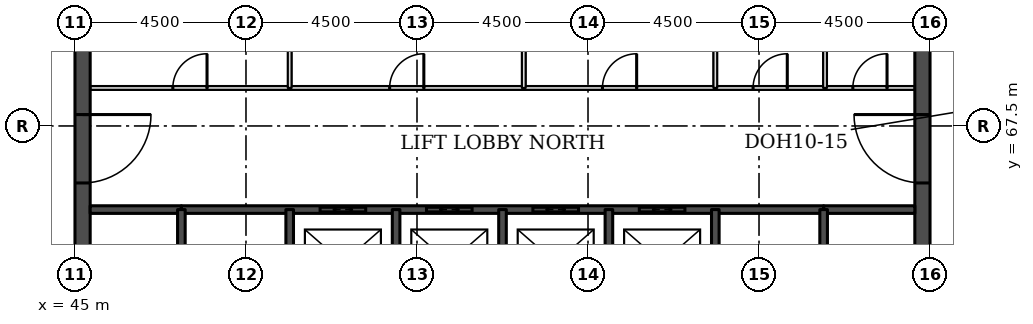
"""IFC4 building model, lengths in metres.
Left out: names, types, materials, properties, quantities, classifications, styles, units other than length and angle.
Written with IfcOpenShell. Run it as: python <this file> out.ifc"""

import sys

from ifc_helpers import new_model, si_unit, direction, frame, frame_2d, origin, place, context, subcontext, project, spatial, rectangle, extrude, element, fill, save


model = new_model("IFC4")
c1 = context("Model", 3, precision=1e-05, world=origin(), true_north=direction((0.0, 1.0)))
c2 = subcontext(c1, "Body", "Model", "MODEL_VIEW")
j1 = project(units=[si_unit("LENGTHUNIT", "METRE"), si_unit("PLANEANGLEUNIT", "RADIAN")], contexts=[c1])
p1 = place(None, origin())
s1 = spatial("IfcSite", under=j1, at=p1, CompositionType="ELEMENT")
p2 = place(p1, origin())
s2 = spatial("IfcBuilding", under=s1, at=p2, CompositionType="ELEMENT")
p3 = place(p2, frame((0.0, 0.0, 223.0)))
s3 = spatial("IfcBuildingStorey", under=s2, at=p3, CompositionType="ELEMENT", Elevation=223.0)
p4 = place(p3, frame((45.2, 49.5, 0.0), z_axis=(0.0, 0.0, 1.0), x_axis=(0.0, 1.0, 0.0)))
e1 = element("IfcWall", 1, at=p4, inside=s3, PredefinedType="SHEAR", context=c2, shape_type="SweptSolid", body=[
    extrude(rectangle(XDim=22.5, YDim=0.4, at=frame_2d((11.25, 0.0))), origin(), (0.0, 0.0, 1.0), 3.7),
])
p5 = place(p4, frame((4.2, 0.0, 0.0)))
e2 = element("IfcOpeningElement", 2, at=p5, cuts=e1, PredefinedType="OPENING", context=c2, shape_type="SweptSolid", body=[
    extrude(rectangle(XDim=1.8, YDim=2.1, at=frame_2d((0.9, 1.05))), frame((0.0, 0.21, 0.0), z_axis=(0.0, -1.0, 0.0), x_axis=(1.0, 0.0, 0.0)), (0.0, 0.0, 1.0), 0.42),
])
p6 = place(p4, frame((6.9, 0.0, 0.0)))
e3 = element("IfcOpeningElement", 3, at=p6, cuts=e1, PredefinedType="OPENING", context=c2, shape_type="SweptSolid", body=[
    extrude(rectangle(XDim=1.1, YDim=2.1, at=frame_2d((0.55, 1.05))), frame((0.0, 0.21, 0.0), z_axis=(0.0, -1.0, 0.0), x_axis=(1.0, 0.0, 0.0)), (0.0, 0.0, 1.0), 0.42),
])
p7 = place(p4, frame((13.6, 0.0, 0.0)))
e4 = element("IfcOpeningElement", 4, at=p7, cuts=e1, PredefinedType="OPENING", context=c2, shape_type="SweptSolid", body=[
    extrude(rectangle(XDim=1.1, YDim=2.1, at=frame_2d((0.55, 1.05))), frame((0.0, 0.21, 0.0), z_axis=(0.0, -1.0, 0.0), x_axis=(1.0, 0.0, 0.0)), (0.0, 0.0, 1.0), 0.42),
])
p8 = place(p4, frame((16.5, 0.0, 0.0)))
e5 = element("IfcOpeningElement", 5, at=p8, cuts=e1, PredefinedType="OPENING", context=c2, shape_type="SweptSolid", body=[
    extrude(rectangle(XDim=1.8, YDim=2.1, at=frame_2d((0.9, 1.05))), frame((0.0, 0.21, 0.0), z_axis=(0.0, -1.0, 0.0), x_axis=(1.0, 0.0, 0.0)), (0.0, 0.0, 1.0), 0.42),
])
p9 = place(p3, frame((67.3, 49.5, 0.0), z_axis=(0.0, 0.0, 1.0), x_axis=(0.0, 1.0, 0.0)))
e6 = element("IfcWall", 6, at=p9, inside=s3, PredefinedType="SHEAR", context=c2, shape_type="SweptSolid", body=[
    extrude(rectangle(XDim=22.5, YDim=0.4, at=frame_2d((11.25, 0.0))), origin(), (0.0, 0.0, 1.0), 3.7),
])
p10 = place(p9, frame((4.2, 0.0, 0.0)))
e7 = element("IfcOpeningElement", 7, at=p10, cuts=e6, PredefinedType="OPENING", context=c2, shape_type="SweptSolid", body=[
    extrude(rectangle(XDim=1.8, YDim=2.1, at=frame_2d((0.9, 1.05))), frame((0.0, 0.21, 0.0), z_axis=(0.0, -1.0, 0.0), x_axis=(1.0, 0.0, 0.0)), (0.0, 0.0, 1.0), 0.42),
])
p11 = place(p9, frame((6.9, 0.0, 0.0)))
e8 = element("IfcOpeningElement", 8, at=p11, cuts=e6, PredefinedType="OPENING", context=c2, shape_type="SweptSolid", body=[
    extrude(rectangle(XDim=1.1, YDim=2.1, at=frame_2d((0.55, 1.05))), frame((0.0, 0.21, 0.0), z_axis=(0.0, -1.0, 0.0), x_axis=(1.0, 0.0, 0.0)), (0.0, 0.0, 1.0), 0.42),
])
p12 = place(p9, frame((13.6, 0.0, 0.0)))
e9 = element("IfcOpeningElement", 9, at=p12, cuts=e6, PredefinedType="OPENING", context=c2, shape_type="SweptSolid", body=[
    extrude(rectangle(XDim=1.1, YDim=2.1, at=frame_2d((0.55, 1.05))), frame((0.0, 0.21, 0.0), z_axis=(0.0, -1.0, 0.0), x_axis=(1.0, 0.0, 0.0)), (0.0, 0.0, 1.0), 0.42),
])
p13 = place(p9, frame((16.5, 0.0, 0.0)))
e10 = element("IfcOpeningElement", 10, at=p13, cuts=e6, PredefinedType="OPENING", context=c2, shape_type="SweptSolid", body=[
    extrude(rectangle(XDim=1.8, YDim=2.1, at=frame_2d((0.9, 1.05))), frame((0.0, 0.21, 0.0), z_axis=(0.0, -1.0, 0.0), x_axis=(1.0, 0.0, 0.0)), (0.0, 0.0, 1.0), 0.42),
])
for number, where, z_axis, x_axis in (
    (11, (45.4, 65.3, 0.0), (0.0, 0.0, 1.0), (1.0, 0.0, 0.0)),
    (12, (64.7, 65.3, 0.0), (0.0, 0.0, 1.0), (1.0, 0.0, 0.0)),
):
    element("IfcWall", number, at=place(p3, frame(where, z_axis=z_axis, x_axis=x_axis)), inside=s3, PredefinedType="SOLIDWALL", context=c2, shape_type="SweptSolid", body=[
        extrude(rectangle(XDim=2.4, YDim=0.2, at=frame_2d((1.2, 0.0))), origin(), (0.0, 0.0, 1.0), 3.55),
    ])
p14 = place(p3, frame((47.8, 65.3, 0.0), z_axis=(0.0, 0.0, 1.0), x_axis=(1.0, 0.0, 0.0)))
e13 = element("IfcWall", 13, at=p14, inside=s3, PredefinedType="SOLIDWALL", context=c2, shape_type="SweptSolid", body=[
    extrude(rectangle(XDim=16.9, YDim=0.2, at=frame_2d((8.45, 0.0))), origin(), (0.0, 0.0, 1.0), 3.55),
])
p15 = place(p14, frame((3.65, 0.0, 0.0)))
e14 = element("IfcOpeningElement", 14, at=p15, cuts=e13, PredefinedType="OPENING", context=c2, shape_type="SweptSolid", body=[
    extrude(rectangle(XDim=1.2, YDim=2.1, at=frame_2d((0.6, 1.05))), frame((0.0, 0.11, 0.0), z_axis=(0.0, -1.0, 0.0), x_axis=(1.0, 0.0, 0.0)), (0.0, 0.0, 1.0), 0.22),
])
p16 = place(p14, frame((6.45, 0.0, 0.0)))
e15 = element("IfcOpeningElement", 15, at=p16, cuts=e13, PredefinedType="OPENING", context=c2, shape_type="SweptSolid", body=[
    extrude(rectangle(XDim=1.2, YDim=2.1, at=frame_2d((0.6, 1.05))), frame((0.0, 0.11, 0.0), z_axis=(0.0, -1.0, 0.0), x_axis=(1.0, 0.0, 0.0)), (0.0, 0.0, 1.0), 0.22),
])
p17 = place(p14, frame((9.25, 0.0, 0.0)))
e16 = element("IfcOpeningElement", 16, at=p17, cuts=e13, PredefinedType="OPENING", context=c2, shape_type="SweptSolid", body=[
    extrude(rectangle(XDim=1.2, YDim=2.1, at=frame_2d((0.6, 1.05))), frame((0.0, 0.11, 0.0), z_axis=(0.0, -1.0, 0.0), x_axis=(1.0, 0.0, 0.0)), (0.0, 0.0, 1.0), 0.22),
])
p18 = place(p14, frame((12.05, 0.0, 0.0)))
e17 = element("IfcOpeningElement", 17, at=p18, cuts=e13, PredefinedType="OPENING", context=c2, shape_type="SweptSolid", body=[
    extrude(rectangle(XDim=1.2, YDim=2.1, at=frame_2d((0.6, 1.05))), frame((0.0, 0.11, 0.0), z_axis=(0.0, -1.0, 0.0), x_axis=(1.0, 0.0, 0.0)), (0.0, 0.0, 1.0), 0.22),
])
p19 = place(p3, frame((45.4, 68.5, 0.0), z_axis=(0.0, 0.0, 1.0), x_axis=(1.0, 0.0, 0.0)))
e18 = element("IfcWall", 18, at=p19, inside=s3, PredefinedType="PARTITIONING", context=c2, shape_type="SweptSolid", body=[
    extrude(rectangle(XDim=21.7, YDim=0.1, at=frame_2d((10.85, 0.0))), origin(), (0.0, 0.0, 1.0), 3.55),
])
p20 = place(p19, frame((20.069, 0.0, 0.0)))
e19 = element("IfcOpeningElement", 19, at=p20, cuts=e18, PredefinedType="OPENING", context=c2, shape_type="SweptSolid", body=[
    extrude(rectangle(XDim=0.9, YDim=2.1, at=frame_2d((0.45, 1.05))), frame((0.0, 0.06, 0.0), z_axis=(0.0, -1.0, 0.0), x_axis=(1.0, 0.0, 0.0)), (0.0, 0.0, 1.0), 0.12),
])
p21 = place(p19, frame((17.444, 0.0, 0.0)))
e20 = element("IfcOpeningElement", 20, at=p21, cuts=e18, PredefinedType="OPENING", context=c2, shape_type="SweptSolid", body=[
    extrude(rectangle(XDim=0.9, YDim=2.1, at=frame_2d((0.45, 1.05))), frame((0.0, 0.06, 0.0), z_axis=(0.0, -1.0, 0.0), x_axis=(1.0, 0.0, 0.0)), (0.0, 0.0, 1.0), 0.12),
])
p22 = place(p19, frame((2.175, 0.0, 0.0)))
e21 = element("IfcOpeningElement", 21, at=p22, cuts=e18, PredefinedType="OPENING", context=c2, shape_type="SweptSolid", body=[
    extrude(rectangle(XDim=0.9, YDim=2.1, at=frame_2d((0.45, 1.05))), frame((0.0, 0.06, 0.0), z_axis=(0.0, -1.0, 0.0), x_axis=(1.0, 0.0, 0.0)), (0.0, 0.0, 1.0), 0.12),
])
p23 = place(p19, frame((13.48, 0.0, 0.0)))
e22 = element("IfcOpeningElement", 22, at=p23, cuts=e18, PredefinedType="OPENING", context=c2, shape_type="SweptSolid", body=[
    extrude(rectangle(XDim=0.9, YDim=2.1, at=frame_2d((0.45, 1.05))), frame((0.0, 0.06, 0.0), z_axis=(0.0, -1.0, 0.0), x_axis=(1.0, 0.0, 0.0)), (0.0, 0.0, 1.0), 0.12),
])
p24 = place(p19, frame((7.88, 0.0, 0.0)))
e23 = element("IfcOpeningElement", 23, at=p24, cuts=e18, PredefinedType="OPENING", context=c2, shape_type="SweptSolid", body=[
    extrude(rectangle(XDim=0.9, YDim=2.1, at=frame_2d((0.45, 1.05))), frame((0.0, 0.06, 0.0), z_axis=(0.0, -1.0, 0.0), x_axis=(1.0, 0.0, 0.0)), (0.0, 0.0, 1.0), 0.12),
])
p25 = place(p3, frame((47.8, 62.0, 0.0), z_axis=(0.0, 0.0, 1.0), x_axis=(0.0, 1.0, 0.0)))
e24 = element("IfcWall", 24, at=p25, inside=s3, PredefinedType="SOLIDWALL", context=c2, shape_type="SweptSolid", body=[
    extrude(rectangle(XDim=3.3, YDim=0.2, at=frame_2d((1.65, 0.0))), origin(), (0.0, 0.0, 1.0), 3.55),
])
p26 = place(p25, frame((1.1, 0.0, 0.0)))
e25 = element("IfcOpeningElement", 25, at=p26, cuts=e24, PredefinedType="OPENING", context=c2, shape_type="SweptSolid", body=[
    extrude(rectangle(XDim=1.1, YDim=2.1, at=frame_2d((0.55, 1.05))), frame((0.0, 0.11, 0.0), z_axis=(0.0, -1.0, 0.0), x_axis=(1.0, 0.0, 0.0)), (0.0, 0.0, 1.0), 0.22),
])
p27 = place(p3, frame((50.65, 68.5, 0.0), z_axis=(0.0, 0.0, 1.0), x_axis=(0.0, 1.0, 0.0)))
e26 = element("IfcWall", 26, at=p27, inside=s3, PredefinedType="PARTITIONING", context=c2, shape_type="SweptSolid", body=[
    extrude(rectangle(XDim=3.1, YDim=0.1, at=frame_2d((1.55, 0.0))), origin(), (0.0, 0.0, 1.0), 3.55),
])
p28 = place(p3, frame((50.65, 62.0, 0.0), z_axis=(0.0, 0.0, 1.0), x_axis=(0.0, 1.0, 0.0)))
e27 = element("IfcWall", 27, at=p28, inside=s3, PredefinedType="SOLIDWALL", context=c2, shape_type="SweptSolid", body=[
    extrude(rectangle(XDim=3.3, YDim=0.2, at=frame_2d((1.65, 0.0))), origin(), (0.0, 0.0, 1.0), 3.55),
])
for number, where, z_axis, x_axis in (
    (28, (53.45, 62.5, 0.0), (0.0, 0.0, 1.0), (0.0, 1.0, 0.0)),
    (29, (56.25, 62.5, 0.0), (0.0, 0.0, 1.0), (0.0, 1.0, 0.0)),
):
    element("IfcWall", number, at=place(p3, frame(where, z_axis=z_axis, x_axis=x_axis)), inside=s3, PredefinedType="SOLIDWALL", context=c2, shape_type="SweptSolid", body=[
        extrude(rectangle(XDim=2.8, YDim=0.2, at=frame_2d((1.4, 0.0))), origin(), (0.0, 0.0, 1.0), 3.55),
    ])
p29 = place(p3, frame((56.81, 68.5, 0.0), z_axis=(0.0, 0.0, 1.0), x_axis=(0.0, 1.0, 0.0)))
e30 = element("IfcWall", 30, at=p29, inside=s3, PredefinedType="PARTITIONING", context=c2, shape_type="SweptSolid", body=[
    extrude(rectangle(XDim=3.1, YDim=0.1, at=frame_2d((1.55, 0.0))), origin(), (0.0, 0.0, 1.0), 3.55),
])
p30 = place(p3, frame((59.05, 62.5, 0.0), z_axis=(0.0, 0.0, 1.0), x_axis=(0.0, 1.0, 0.0)))
e31 = element("IfcWall", 31, at=p30, inside=s3, PredefinedType="SOLIDWALL", context=c2, shape_type="SweptSolid", body=[
    extrude(rectangle(XDim=2.8, YDim=0.2, at=frame_2d((1.4, 0.0))), origin(), (0.0, 0.0, 1.0), 3.55),
])
p31 = place(p3, frame((61.85, 68.5, 0.0), z_axis=(0.0, 0.0, 1.0), x_axis=(0.0, 1.0, 0.0)))
e32 = element("IfcWall", 32, at=p31, inside=s3, PredefinedType="PARTITIONING", context=c2, shape_type="SweptSolid", body=[
    extrude(rectangle(XDim=3.1, YDim=0.1, at=frame_2d((1.55, 0.0))), origin(), (0.0, 0.0, 1.0), 3.55),
])
p32 = place(p3, frame((61.85, 62.0, 0.0), z_axis=(0.0, 0.0, 1.0), x_axis=(0.0, 1.0, 0.0)))
e33 = element("IfcWall", 33, at=p32, inside=s3, PredefinedType="SOLIDWALL", context=c2, shape_type="SweptSolid", body=[
    extrude(rectangle(XDim=3.3, YDim=0.2, at=frame_2d((1.65, 0.0))), origin(), (0.0, 0.0, 1.0), 3.55),
])
p33 = place(p3, frame((64.7, 62.0, 0.0), z_axis=(0.0, 0.0, 1.0), x_axis=(0.0, 1.0, 0.0)))
e34 = element("IfcWall", 34, at=p33, inside=s3, PredefinedType="SOLIDWALL", context=c2, shape_type="SweptSolid", body=[
    extrude(rectangle(XDim=3.3, YDim=0.2, at=frame_2d((1.65, 0.0))), origin(), (0.0, 0.0, 1.0), 3.55),
])
p34 = place(p33, frame((1.1, 0.0, 0.0)))
e35 = element("IfcOpeningElement", 35, at=p34, cuts=e34, PredefinedType="OPENING", context=c2, shape_type="SweptSolid", body=[
    extrude(rectangle(XDim=1.1, YDim=2.1, at=frame_2d((0.55, 1.05))), frame((0.0, 0.11, 0.0), z_axis=(0.0, -1.0, 0.0), x_axis=(1.0, 0.0, 0.0)), (0.0, 0.0, 1.0), 0.22),
])
p35 = place(p3, frame((64.738, 68.5, 0.0), z_axis=(0.0, 0.0, 1.0), x_axis=(0.0, 1.0, 0.0)))
e36 = element("IfcWall", 36, at=p35, inside=s3, PredefinedType="PARTITIONING", context=c2, shape_type="SweptSolid", body=[
    extrude(rectangle(XDim=3.1, YDim=0.1, at=frame_2d((1.55, 0.0))), origin(), (0.0, 0.0, 1.0), 3.55),
])
p36 = place(p15, origin())
e37 = element("IfcDoor", 37, at=p36, inside=s3, OperationType="DOUBLE_DOOR_SLIDING", PredefinedType="DOOR", context=c2, shape_type="SweptSolid", body=[
    extrude(rectangle(XDim=1.2, YDim=2.1, at=frame_2d((0.6, 1.05))), frame((0.0, 0.025, 0.0), z_axis=(0.0, -1.0, 0.0), x_axis=(1.0, 0.0, 0.0)), (0.0, 0.0, 1.0), 0.05),
])
fill(e14, e37)
p37 = place(p16, origin())
e38 = element("IfcDoor", 38, at=p37, inside=s3, OperationType="DOUBLE_DOOR_SLIDING", PredefinedType="DOOR", context=c2, shape_type="SweptSolid", body=[
    extrude(rectangle(XDim=1.2, YDim=2.1, at=frame_2d((0.6, 1.05))), frame((0.0, 0.025, 0.0), z_axis=(0.0, -1.0, 0.0), x_axis=(1.0, 0.0, 0.0)), (0.0, 0.0, 1.0), 0.05),
])
fill(e15, e38)
p38 = place(p17, origin())
e39 = element("IfcDoor", 39, at=p38, inside=s3, OperationType="DOUBLE_DOOR_SLIDING", PredefinedType="DOOR", context=c2, shape_type="SweptSolid", body=[
    extrude(rectangle(XDim=1.2, YDim=2.1, at=frame_2d((0.6, 1.05))), frame((0.0, 0.025, 0.0), z_axis=(0.0, -1.0, 0.0), x_axis=(1.0, 0.0, 0.0)), (0.0, 0.0, 1.0), 0.05),
])
fill(e16, e39)
p39 = place(p18, origin())
e40 = element("IfcDoor", 40, at=p39, inside=s3, OperationType="DOUBLE_DOOR_SLIDING", PredefinedType="DOOR", context=c2, shape_type="SweptSolid", body=[
    extrude(rectangle(XDim=1.2, YDim=2.1, at=frame_2d((0.6, 1.05))), frame((0.0, 0.025, 0.0), z_axis=(0.0, -1.0, 0.0), x_axis=(1.0, 0.0, 0.0)), (0.0, 0.0, 1.0), 0.05),
])
fill(e17, e40)
p40 = place(p8, frame((1.8, 0.0, 0.0), z_axis=(0.0, 0.0, 1.0), x_axis=(-1.0, 0.0, 0.0)))
e41 = element("IfcDoor", 41, at=p40, inside=s3, OperationType="SINGLE_SWING_LEFT", PredefinedType="DOOR", context=c2, shape_type="SweptSolid", body=[
    extrude(rectangle(XDim=1.8, YDim=2.1, at=frame_2d((0.9, 1.05))), frame((0.0, 0.025, 0.0), z_axis=(0.0, -1.0, 0.0), x_axis=(1.0, 0.0, 0.0)), (0.0, 0.0, 1.0), 0.05),
])
fill(e5, e41)
p41 = place(p13, origin())
e42 = element("IfcDoor", 42, at=p41, inside=s3, OperationType="SINGLE_SWING_RIGHT", PredefinedType="DOOR", context=c2, shape_type="SweptSolid", body=[
    extrude(rectangle(XDim=1.8, YDim=2.1, at=frame_2d((0.9, 1.05))), frame((0.0, 0.025, 0.0), z_axis=(0.0, -1.0, 0.0), x_axis=(1.0, 0.0, 0.0)), (0.0, 0.0, 1.0), 0.05),
])
fill(e10, e42)
p42 = place(p20, origin())
e43 = element("IfcDoor", 43, at=p42, inside=s3, OperationType="SINGLE_SWING_RIGHT", PredefinedType="DOOR", context=c2, shape_type="SweptSolid", body=[
    extrude(rectangle(XDim=0.9, YDim=2.1, at=frame_2d((0.45, 1.05))), frame((0.0, 0.025, 0.0), z_axis=(0.0, -1.0, 0.0), x_axis=(1.0, 0.0, 0.0)), (0.0, 0.0, 1.0), 0.05),
])
fill(e19, e43)
p43 = place(p21, origin())
e44 = element("IfcDoor", 44, at=p43, inside=s3, OperationType="SINGLE_SWING_RIGHT", PredefinedType="DOOR", context=c2, shape_type="SweptSolid", body=[
    extrude(rectangle(XDim=0.9, YDim=2.1, at=frame_2d((0.45, 1.05))), frame((0.0, 0.025, 0.0), z_axis=(0.0, -1.0, 0.0), x_axis=(1.0, 0.0, 0.0)), (0.0, 0.0, 1.0), 0.05),
])
fill(e20, e44)
p44 = place(p22, origin())
e45 = element("IfcDoor", 45, at=p44, inside=s3, OperationType="SINGLE_SWING_RIGHT", PredefinedType="DOOR", context=c2, shape_type="SweptSolid", body=[
    extrude(rectangle(XDim=0.9, YDim=2.1, at=frame_2d((0.45, 1.05))), frame((0.0, 0.025, 0.0), z_axis=(0.0, -1.0, 0.0), x_axis=(1.0, 0.0, 0.0)), (0.0, 0.0, 1.0), 0.05),
])
fill(e21, e45)
p45 = place(p23, origin())
e46 = element("IfcDoor", 46, at=p45, inside=s3, OperationType="SINGLE_SWING_RIGHT", PredefinedType="DOOR", context=c2, shape_type="SweptSolid", body=[
    extrude(rectangle(XDim=0.9, YDim=2.1, at=frame_2d((0.45, 1.05))), frame((0.0, 0.025, 0.0), z_axis=(0.0, -1.0, 0.0), x_axis=(1.0, 0.0, 0.0)), (0.0, 0.0, 1.0), 0.05),
])
fill(e22, e46)
p46 = place(p24, origin())
e47 = element("IfcDoor", 47, at=p46, inside=s3, OperationType="SINGLE_SWING_RIGHT", PredefinedType="DOOR", context=c2, shape_type="SweptSolid", body=[
    extrude(rectangle(XDim=0.9, YDim=2.1, at=frame_2d((0.45, 1.05))), frame((0.0, 0.025, 0.0), z_axis=(0.0, -1.0, 0.0), x_axis=(1.0, 0.0, 0.0)), (0.0, 0.0, 1.0), 0.05),
])
fill(e23, e47)
save(model, sys.argv[1])
